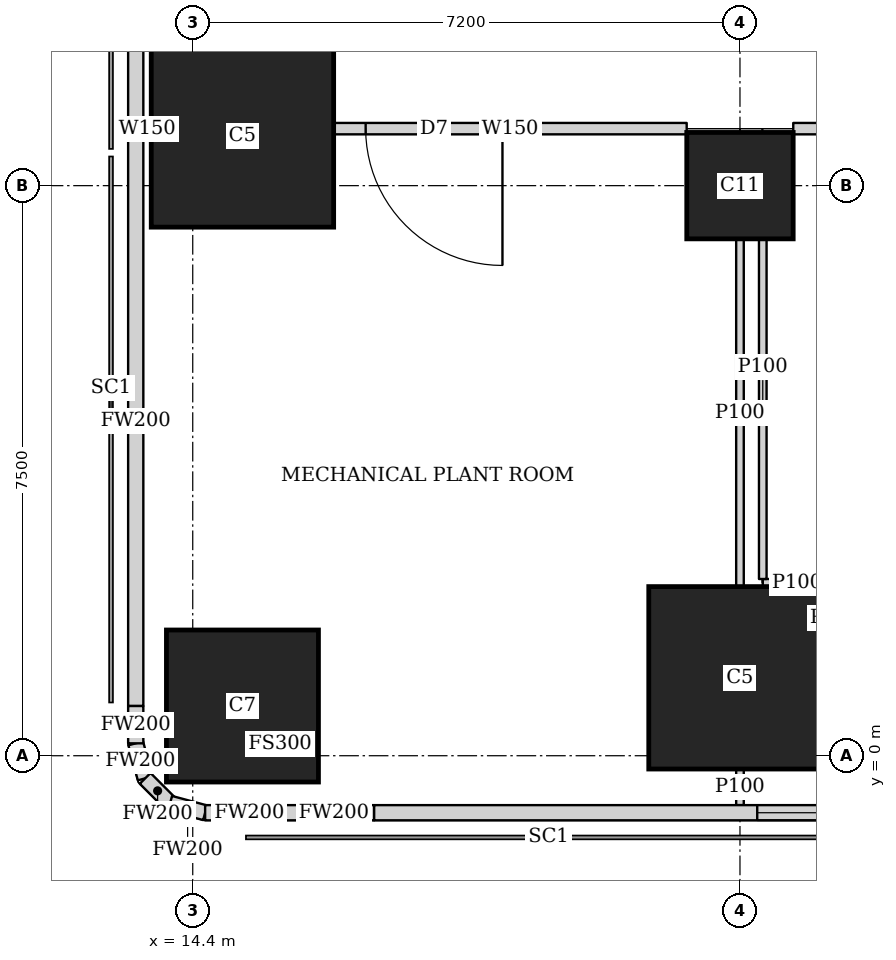
"""IFC4 building model, lengths in metres.
Left out: names, types, materials, properties, quantities, classifications, styles, units other than length and angle.
Written with IfcOpenShell. Run it as: python <this file> out.ifc"""

import sys

from ifc_helpers import new_model, si_unit, direction, frame, frame_2d, origin, origin_2d, place, context, subcontext, project, spatial, rectangle, extrude, element, fill, save


model = new_model("IFC4")
c1 = context("Model", 3, precision=1e-05, world=origin(), true_north=direction((0.0, 1.0)))
c2 = subcontext(c1, "Body", "Model", "MODEL_VIEW")
j1 = project(units=[si_unit("LENGTHUNIT", "METRE"), si_unit("PLANEANGLEUNIT", "RADIAN")], contexts=[c1])
p1 = place(None, origin())
s1 = spatial("IfcSite", under=j1, at=p1, CompositionType="ELEMENT")
p2 = place(p1, origin())
s2 = spatial("IfcBuilding", under=s1, at=p2, CompositionType="ELEMENT")
p3 = place(p2, frame((0.0, 0.0, 246.2)))
s3 = spatial("IfcBuildingStorey", under=s2, at=p3, CompositionType="ELEMENT", Elevation=246.2)
p4 = place(p3, frame((15.054, 0.654, 0.0), z_axis=(0.0, 0.0, 1.0), x_axis=(1.0, 0.0, 0.0)))
e1 = element("IfcColumn", 1, at=p4, inside=s3, PredefinedType="COLUMN", context=c2, shape_type="SweptSolid", body=[
    extrude(rectangle(XDim=2.0, YDim=2.0, at=origin_2d()), origin(), (0.0, 0.0, 1.0), 5.4),
])
for number, where, z_axis, x_axis in (
    (2, (21.6, 1.025, 0.0), (0.0, 0.0, 1.0), (1.0, 0.0, 0.0)),
    (3, (15.054, 8.154, 0.0), (0.0, 0.0, 1.0), (1.0, 0.0, 0.0)),
):
    element("IfcColumn", number, at=place(p3, frame(where, z_axis=z_axis, x_axis=x_axis)), inside=s3, PredefinedType="COLUMN", context=c2, shape_type="SweptSolid", body=[
        extrude(rectangle(XDim=2.4, YDim=2.4, at=origin_2d()), origin(), (0.0, 0.0, 1.0), 5.4),
    ])
p5 = place(p3, frame((21.6, 7.5, 0.0), z_axis=(0.0, 0.0, 1.0), x_axis=(1.0, 0.0, 0.0)))
e4 = element("IfcColumn", 4, at=p5, inside=s3, PredefinedType="COLUMN", context=c2, shape_type="SweptSolid", body=[
    extrude(rectangle(XDim=1.4, YDim=1.4, at=origin_2d()), origin(), (0.0, 0.0, 1.0), 5.4),
])
p6 = place(p3, frame((14.563, -0.75, 0.0), z_axis=(0.0, 0.0, 1.0), x_axis=(1.0, 0.0, 0.0)))
e5 = element("IfcWall", 5, at=p6, inside=s3, PredefinedType="SOLIDWALL", context=c2, shape_type="SweptSolid", body=[
    extrude(rectangle(XDim=0.565, YDim=0.2, at=frame_2d((0.282, 0.0))), origin(), (0.0, 0.0, 1.0), 5.15),
])
p7 = place(p3, frame((15.128, -0.75, 0.0), z_axis=(0.0, 0.0, 1.0), x_axis=(1.0, 0.0, 0.0)))
e6 = element("IfcWall", 6, at=p7, inside=s3, PredefinedType="SOLIDWALL", context=c2, shape_type="SweptSolid", body=[
    extrude(rectangle(XDim=1.659, YDim=0.2, at=frame_2d((0.83, 0.0))), origin(), (0.0, 0.0, 1.0), 3.35),
])
p8 = place(p3, frame((16.787, -0.75, 0.0), z_axis=(0.0, 0.0, 1.0), x_axis=(1.0, 0.0, 0.0)))
e7 = element("IfcWall", 7, at=p8, inside=s3, PredefinedType="SOLIDWALL", context=c2, shape_type="SweptSolid", body=[
    extrude(rectangle(XDim=31.004, YDim=0.2, at=frame_2d((15.502, 0.0))), origin(), (0.0, 0.0, 1.0), 5.15),
])
p9 = place(p8, frame((5.04, 0.0, 0.6)))
e8 = element("IfcOpeningElement", 8, at=p9, cuts=e7, PredefinedType="OPENING", context=c2, shape_type="SweptSolid", body=[
    extrude(rectangle(XDim=3.0, YDim=2.7, at=frame_2d((1.5, 1.35))), frame((0.0, 0.11, 0.0), z_axis=(0.0, -1.0, 0.0), x_axis=(1.0, 0.0, 0.0)), (0.0, 0.0, 1.0), 0.22),
])
p10 = place(p8, frame((8.39, 0.0, 0.6)))
e9 = element("IfcOpeningElement", 9, at=p10, cuts=e7, PredefinedType="OPENING", context=c2, shape_type="SweptSolid", body=[
    extrude(rectangle(XDim=3.0, YDim=2.7, at=frame_2d((1.5, 1.35))), frame((0.0, 0.11, 0.0), z_axis=(0.0, -1.0, 0.0), x_axis=(1.0, 0.0, 0.0)), (0.0, 0.0, 1.0), 0.22),
])
p11 = place(p8, frame((12.89, 0.0, 0.6)))
e10 = element("IfcOpeningElement", 10, at=p11, cuts=e7, PredefinedType="OPENING", context=c2, shape_type="SweptSolid", body=[
    extrude(rectangle(XDim=3.0, YDim=2.7, at=frame_2d((1.5, 1.35))), frame((0.0, 0.11, 0.0), z_axis=(0.0, -1.0, 0.0), x_axis=(1.0, 0.0, 0.0)), (0.0, 0.0, 1.0), 0.22),
])
p12 = place(p8, frame((17.44, 0.0, 0.6)))
e11 = element("IfcOpeningElement", 11, at=p12, cuts=e7, PredefinedType="OPENING", context=c2, shape_type="SweptSolid", body=[
    extrude(rectangle(XDim=3.0, YDim=2.7, at=frame_2d((1.5, 1.35))), frame((0.0, 0.11, 0.0), z_axis=(0.0, -1.0, 0.0), x_axis=(1.0, 0.0, 0.0)), (0.0, 0.0, 1.0), 0.22),
])
p13 = place(p8, frame((21.89, 0.0, 0.6)))
e12 = element("IfcOpeningElement", 12, at=p13, cuts=e7, PredefinedType="OPENING", context=c2, shape_type="SweptSolid", body=[
    extrude(rectangle(XDim=3.0, YDim=2.7, at=frame_2d((1.5, 1.35))), frame((0.0, 0.11, 0.0), z_axis=(0.0, -1.0, 0.0), x_axis=(1.0, 0.0, 0.0)), (0.0, 0.0, 1.0), 0.22),
])
p14 = place(p8, frame((26.39, 0.0, 0.6)))
e13 = element("IfcOpeningElement", 13, at=p14, cuts=e7, PredefinedType="OPENING", context=c2, shape_type="SweptSolid", body=[
    extrude(rectangle(XDim=3.0, YDim=2.7, at=frame_2d((1.5, 1.35))), frame((0.0, 0.11, 0.0), z_axis=(0.0, -1.0, 0.0), x_axis=(1.0, 0.0, 0.0)), (0.0, 0.0, 1.0), 0.22),
])
p15 = place(p3, frame((13.65, 12.34, 0.0), z_axis=(0.0, 0.0, 1.0), x_axis=(0.0, -1.0, 0.0)))
e14 = element("IfcWall", 14, at=p15, inside=s3, PredefinedType="SOLIDWALL", context=c2, shape_type="SweptSolid", body=[
    extrude(rectangle(XDim=4.186, YDim=0.2, at=frame_2d((2.093, 0.0))), origin(), (0.0, 0.0, 1.0), 5.15),
])
p16 = place(p3, frame((13.65, 8.154, 0.0), z_axis=(0.0, 0.0, 1.0), x_axis=(0.0, -1.0, 0.0)))
e15 = element("IfcWall", 15, at=p16, inside=s3, PredefinedType="SOLIDWALL", context=c2, shape_type="SweptSolid", body=[
    extrude(rectangle(XDim=7.5, YDim=0.2, at=frame_2d((3.75, 0.0))), origin(), (0.0, 0.0, 1.0), 3.35),
])
p17 = place(p3, frame((13.65, 0.654, 0.0), z_axis=(0.0, 0.0, 1.0), x_axis=(0.0, -1.0, 0.0)))
e16 = element("IfcWall", 16, at=p17, inside=s3, PredefinedType="SOLIDWALL", context=c2, shape_type="SweptSolid", body=[
    extrude(rectangle(XDim=0.491, YDim=0.2, at=frame_2d((0.246, 0.0))), origin(), (0.0, 0.0, 1.0), 5.15),
])
p18 = place(p3, frame((13.65, 0.163, 0.0), z_axis=(0.0, 0.0, 1.0), x_axis=(0.259698463175, -0.965689757751, 0.0)))
e17 = element("IfcWall", 17, at=p18, inside=s3, PredefinedType="SOLIDWALL", context=c2, shape_type="SweptSolid", body=[
    extrude(rectangle(XDim=0.478, YDim=0.2, at=frame_2d((0.239, 0.0))), origin(), (0.0, 0.0, 1.0), 5.15),
])
p19 = place(p3, frame((13.774, -0.298, 0.0), z_axis=(0.0, 0.0, 1.0), x_axis=(0.707369890659, -0.706843573776, 0.0)))
e18 = element("IfcWall", 18, at=p19, inside=s3, PredefinedType="SOLIDWALL", context=c2, shape_type="SweptSolid", body=[
    extrude(rectangle(XDim=0.464, YDim=0.2, at=frame_2d((0.232, 0.0))), origin(), (0.0, 0.0, 1.0), 5.15),
])
p20 = place(p3, frame((14.102, -0.626, 0.0), z_axis=(0.0, 0.0, 1.0), x_axis=(0.965655254015, -0.259826731483, 0.0)))
e19 = element("IfcWall", 19, at=p20, inside=s3, PredefinedType="SOLIDWALL", context=c2, shape_type="SweptSolid", body=[
    extrude(rectangle(XDim=0.477, YDim=0.2, at=frame_2d((0.239, 0.0))), origin(), (0.0, 0.0, 1.0), 5.15),
])
p21 = place(p3, frame((28.099, 8.25, 0.0), z_axis=(0.0, 0.0, 1.0), x_axis=(-1.0, 0.0, 0.0)))
e20 = element("IfcWall", 20, at=p21, inside=s3, PredefinedType="SOLIDWALL", context=c2, shape_type="SweptSolid", body=[
    extrude(rectangle(XDim=5.798, YDim=0.15, at=frame_2d((2.899, 0.0))), origin(), (0.0, 0.0, 1.0), 2.75),
])
p22 = place(p21, frame((0.15, 0.0, 0.0)))
e21 = element("IfcOpeningElement", 21, at=p22, cuts=e20, PredefinedType="OPENING", context=c2, shape_type="SweptSolid", body=[
    extrude(rectangle(XDim=2.0, YDim=2.1, at=frame_2d((1.0, 1.05))), frame((0.0, 0.085, 0.0), z_axis=(0.0, -1.0, 0.0), x_axis=(1.0, 0.0, 0.0)), (0.0, 0.0, 1.0), 0.17),
])
p23 = place(p3, frame((20.899, 8.25, 0.0), z_axis=(0.0, 0.0, 1.0), x_axis=(-1.0, 0.0, 0.0)))
e22 = element("IfcWall", 22, at=p23, inside=s3, PredefinedType="SOLIDWALL", context=c2, shape_type="SweptSolid", body=[
    extrude(rectangle(XDim=4.644, YDim=0.15, at=frame_2d((2.322, 0.0))), origin(), (0.0, 0.0, 1.0), 2.75),
])
p24 = place(p23, frame((2.424, 0.0, 0.0)))
e23 = element("IfcOpeningElement", 23, at=p24, cuts=e22, PredefinedType="OPENING", context=c2, shape_type="SweptSolid", body=[
    extrude(rectangle(XDim=1.8, YDim=2.4, at=frame_2d((0.9, 1.2))), frame((0.0, 0.085, 0.0), z_axis=(0.0, -1.0, 0.0), x_axis=(1.0, 0.0, 0.0)), (0.0, 0.0, 1.0), 0.17),
])
p25 = place(p3, frame((13.853, 8.25, 0.0), z_axis=(0.0, 0.0, 1.0), x_axis=(-1.0, 0.0, 0.0)))
e24 = element("IfcWall", 24, at=p25, inside=s3, PredefinedType="SOLIDWALL", context=c2, shape_type="SweptSolid", body=[
    extrude(rectangle(XDim=0.103, YDim=0.15, at=frame_2d((0.052, 0.0))), origin(), (0.0, 0.0, 1.0), 3.35),
])
p26 = place(p3, frame((21.6, -0.65, 0.0), z_axis=(0.0, 0.0, 1.0), x_axis=(0.0, 1.0, 0.0)))
e25 = element("IfcWall", 25, at=p26, inside=s3, PredefinedType="PARTITIONING", context=c2, shape_type="SweptSolid", body=[
    extrude(rectangle(XDim=0.474, YDim=0.1, at=frame_2d((0.237, 0.0))), origin(), (0.0, 0.0, 1.0), 3.35),
])
p27 = place(p3, frame((21.6, 2.226, 0.0), z_axis=(0.0, 0.0, 1.0), x_axis=(0.0, 1.0, 0.0)))
e26 = element("IfcWall", 26, at=p27, inside=s3, PredefinedType="PARTITIONING", context=c2, shape_type="SweptSolid", body=[
    extrude(rectangle(XDim=4.573, YDim=0.1, at=frame_2d((2.287, 0.0))), origin(), (0.0, 0.0, 1.0), 2.75),
])
p28 = place(p3, frame((22.8, 2.275, 0.0), z_axis=(0.0, 0.0, 1.0), x_axis=(-1.0, 0.0, 0.0)))
e27 = element("IfcWall", 27, at=p28, inside=s3, PredefinedType="PARTITIONING", context=c2, shape_type="SweptSolid", body=[
    extrude(rectangle(XDim=0.9, YDim=0.1, at=frame_2d((0.45, 0.0))), origin(), (0.0, 0.0, 1.0), 3.35),
])
p29 = place(p3, frame((21.9, 2.325, 0.0), z_axis=(0.0, 0.0, 1.0), x_axis=(0.0, 1.0, 0.0)))
e28 = element("IfcWall", 28, at=p29, inside=s3, PredefinedType="PARTITIONING", context=c2, shape_type="SweptSolid", body=[
    extrude(rectangle(XDim=4.474, YDim=0.1, at=frame_2d((2.237, 0.0))), origin(), (0.0, 0.0, 1.0), 2.75),
])
p30 = place(p9, origin())
e29 = element("IfcWindow", 29, at=p30, inside=s3, PartitioningType="SINGLE_PANEL", PredefinedType="USERDEFINED", context=c2, shape_type="SweptSolid", body=[
    extrude(rectangle(XDim=3.0, YDim=2.7, at=frame_2d((1.5, 1.35))), frame((0.0, 0.03, 0.0), z_axis=(0.0, -1.0, 0.0), x_axis=(1.0, 0.0, 0.0)), (0.0, 0.0, 1.0), 0.06),
])
fill(e8, e29)
p31 = place(p24, origin())
e30 = element("IfcDoor", 30, at=p31, inside=s3, OperationType="DOUBLE_DOOR_SINGLE_SWING", PredefinedType="DOOR", context=c2, shape_type="SweptSolid", body=[
    extrude(rectangle(XDim=1.8, YDim=2.4, at=frame_2d((0.9, 1.2))), frame((0.0, 0.025, 0.0), z_axis=(0.0, -1.0, 0.0), x_axis=(1.0, 0.0, 0.0)), (0.0, 0.0, 1.0), 0.05),
])
fill(e23, e30)
save(model, sys.argv[1])
